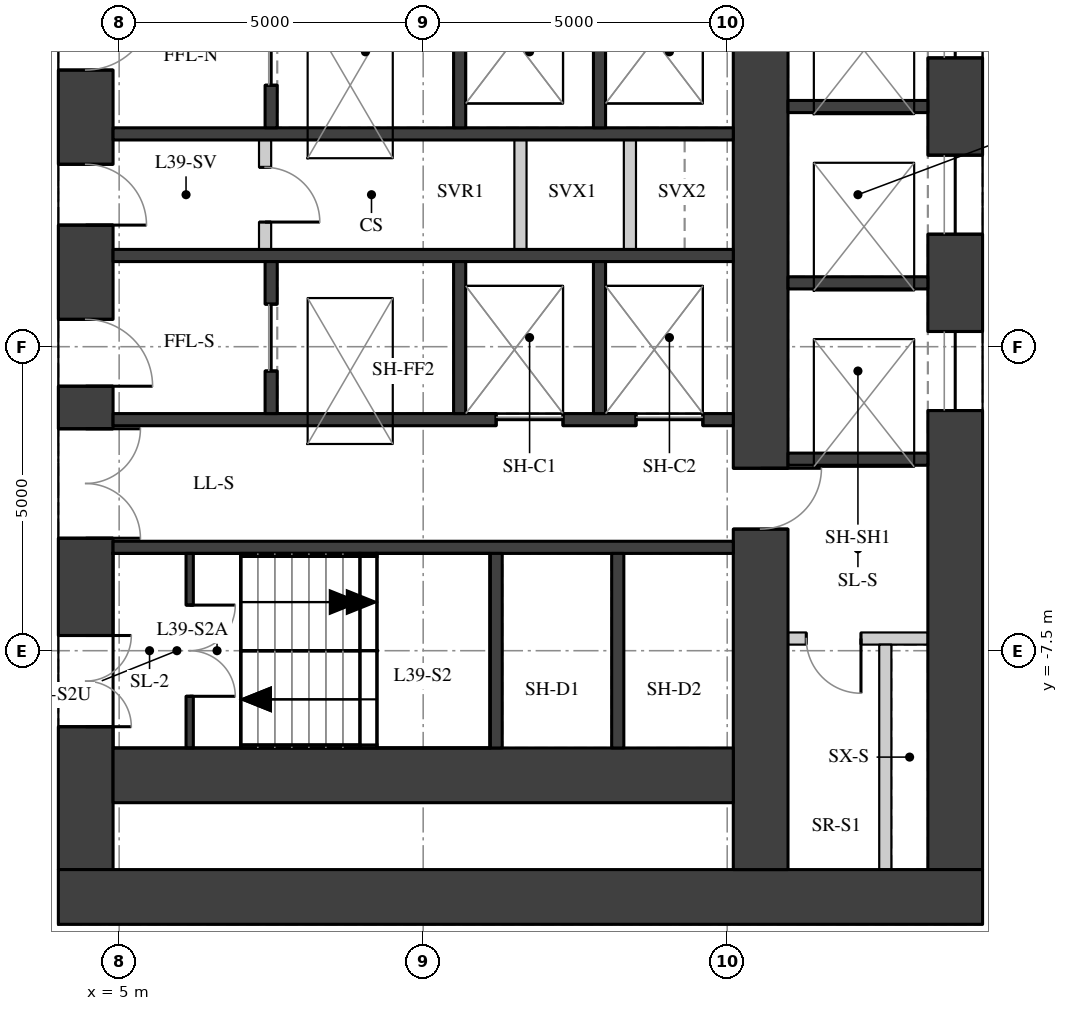
"""IFC4 building model, lengths in metres.
Left out: names, types, materials, properties, quantities, classifications, styles, units other than length and angle.
Written with IfcOpenShell. Run it as: python <this file> out.ifc"""

import sys

from ifc_helpers import new_model, si_unit, direction, frame, frame_2d, origin, place, context, subcontext, project, spatial, rectangle, extrude, element, fill, save


model = new_model("IFC4")
c1 = context("Model", 3, precision=1e-05, world=origin(), true_north=direction((0.0, 1.0)))
c2 = subcontext(c1, "Body", "Model", "MODEL_VIEW")
j1 = project(units=[si_unit("LENGTHUNIT", "METRE"), si_unit("PLANEANGLEUNIT", "RADIAN")], contexts=[c1])
p1 = place(None, origin())
s1 = spatial("IfcSite", under=j1, at=p1, CompositionType="ELEMENT")
p2 = place(p1, origin())
s2 = spatial("IfcBuilding", under=s1, at=p2, CompositionType="ELEMENT")
p3 = place(p2, frame((0.0, 0.0, 139.6)))
s3 = spatial("IfcBuildingStorey", under=s2, at=p3, CompositionType="ELEMENT", Elevation=139.6)
p4 = place(p3, frame((4.45, -11.1, 0.0), z_axis=(0.0, 0.0, 1.0), x_axis=(0.0, 1.0, 0.0)))
e1 = element("IfcWall", 1, at=p4, inside=s3, PredefinedType="SHEAR", context=c2, shape_type="SweptSolid", body=[
    extrude(rectangle(XDim=22.2, YDim=0.9, at=frame_2d((11.1, 0.0))), origin(), (0.0, 0.0, 1.0), 5.22),
])
p5 = place(p4, frame((2.35, 0.0, 0.0)))
e2 = element("IfcOpeningElement", 2, at=p5, cuts=e1, PredefinedType="OPENING", context=c2, shape_type="SweptSolid", body=[
    extrude(rectangle(XDim=1.5, YDim=2.1, at=frame_2d((0.75, 1.05))), frame((0.0, 0.46, 0.0), z_axis=(0.0, -1.0, 0.0), x_axis=(1.0, 0.0, 0.0)), (0.0, 0.0, 1.0), 0.92),
])
p6 = place(p4, frame((5.45, 0.0, 0.0)))
e3 = element("IfcOpeningElement", 3, at=p6, cuts=e1, PredefinedType="OPENING", context=c2, shape_type="SweptSolid", body=[
    extrude(rectangle(XDim=1.8, YDim=2.1, at=frame_2d((0.9, 1.05))), frame((0.0, 0.46, 0.0), z_axis=(0.0, -1.0, 0.0), x_axis=(1.0, 0.0, 0.0)), (0.0, 0.0, 1.0), 0.92),
])
p7 = place(p4, frame((7.95, 0.0, 0.0)))
e4 = element("IfcOpeningElement", 4, at=p7, cuts=e1, PredefinedType="OPENING", context=c2, shape_type="SweptSolid", body=[
    extrude(rectangle(XDim=1.1, YDim=2.1, at=frame_2d((0.55, 1.05))), frame((0.0, 0.46, 0.0), z_axis=(0.0, -1.0, 0.0), x_axis=(1.0, 0.0, 0.0)), (0.0, 0.0, 1.0), 0.92),
])
p8 = place(p4, frame((10.6, 0.0, 0.0)))
e5 = element("IfcOpeningElement", 5, at=p8, cuts=e1, PredefinedType="OPENING", context=c2, shape_type="SweptSolid", body=[
    extrude(rectangle(XDim=1.0, YDim=2.1, at=frame_2d((0.5, 1.05))), frame((0.0, 0.46, 0.0), z_axis=(0.0, -1.0, 0.0), x_axis=(1.0, 0.0, 0.0)), (0.0, 0.0, 1.0), 0.92),
])
p9 = place(p4, frame((13.15, 0.0, 0.0)))
e6 = element("IfcOpeningElement", 6, at=p9, cuts=e1, PredefinedType="OPENING", context=c2, shape_type="SweptSolid", body=[
    extrude(rectangle(XDim=1.1, YDim=2.1, at=frame_2d((0.55, 1.05))), frame((0.0, 0.46, 0.0), z_axis=(0.0, -1.0, 0.0), x_axis=(1.0, 0.0, 0.0)), (0.0, 0.0, 1.0), 0.92),
])
p10 = place(p4, frame((14.95, 0.0, 0.0)))
e7 = element("IfcOpeningElement", 7, at=p10, cuts=e1, PredefinedType="OPENING", context=c2, shape_type="SweptSolid", body=[
    extrude(rectangle(XDim=1.8, YDim=2.1, at=frame_2d((0.9, 1.05))), frame((0.0, 0.46, 0.0), z_axis=(0.0, -1.0, 0.0), x_axis=(1.0, 0.0, 0.0)), (0.0, 0.0, 1.0), 0.92),
])
p11 = place(p4, frame((18.35, 0.0, 0.0)))
e8 = element("IfcOpeningElement", 8, at=p11, cuts=e1, PredefinedType="OPENING", context=c2, shape_type="SweptSolid", body=[
    extrude(rectangle(XDim=1.5, YDim=2.1, at=frame_2d((0.75, 1.05))), frame((0.0, 0.46, 0.0), z_axis=(0.0, -1.0, 0.0), x_axis=(1.0, 0.0, 0.0)), (0.0, 0.0, 1.0), 0.92),
])
p12 = place(p3, frame((18.75, -11.1, 0.0), z_axis=(0.0, 0.0, 1.0), x_axis=(0.0, 1.0, 0.0)))
e9 = element("IfcWall", 9, at=p12, inside=s3, PredefinedType="SHEAR", context=c2, shape_type="SweptSolid", body=[
    extrude(rectangle(XDim=22.2, YDim=0.9, at=frame_2d((11.1, 0.0))), origin(), (0.0, 0.0, 1.0), 5.22),
])
p13 = place(p12, frame((7.55, 0.0, 0.0)))
e10 = element("IfcOpeningElement", 10, at=p13, cuts=e9, PredefinedType="OPENING", context=c2, shape_type="SweptSolid", body=[
    extrude(rectangle(XDim=1.3, YDim=2.1, at=frame_2d((0.65, 1.05))), frame((0.0, 0.46, 0.0), z_axis=(0.0, -1.0, 0.0), x_axis=(1.0, 0.0, 0.0)), (0.0, 0.0, 1.0), 0.92),
])
p14 = place(p12, frame((10.45, 0.0, 0.0)))
e11 = element("IfcOpeningElement", 11, at=p14, cuts=e9, PredefinedType="OPENING", context=c2, shape_type="SweptSolid", body=[
    extrude(rectangle(XDim=1.3, YDim=2.1, at=frame_2d((0.65, 1.05))), frame((0.0, 0.46, 0.0), z_axis=(0.0, -1.0, 0.0), x_axis=(1.0, 0.0, 0.0)), (0.0, 0.0, 1.0), 0.92),
])
p15 = place(p12, frame((13.35, 0.0, 0.0)))
e12 = element("IfcOpeningElement", 12, at=p15, cuts=e9, PredefinedType="OPENING", context=c2, shape_type="SweptSolid", body=[
    extrude(rectangle(XDim=1.3, YDim=2.1, at=frame_2d((0.65, 1.05))), frame((0.0, 0.46, 0.0), z_axis=(0.0, -1.0, 0.0), x_axis=(1.0, 0.0, 0.0)), (0.0, 0.0, 1.0), 0.92),
])
p16 = place(p3, frame((4.0, -11.55, 0.0), z_axis=(0.0, 0.0, 1.0), x_axis=(1.0, 0.0, 0.0)))
e13 = element("IfcWall", 13, at=p16, inside=s3, PredefinedType="SHEAR", context=c2, shape_type="SweptSolid", body=[
    extrude(rectangle(XDim=15.2, YDim=0.9, at=frame_2d((7.6, 0.0))), origin(), (0.0, 0.0, 1.0), 5.22),
])
p17 = place(p3, frame((15.55, -11.1, 0.0), z_axis=(0.0, 0.0, 1.0), x_axis=(0.0, 1.0, 0.0)))
e14 = element("IfcWall", 14, at=p17, inside=s3, PredefinedType="SHEAR", context=c2, shape_type="SweptSolid", body=[
    extrude(rectangle(XDim=22.2, YDim=0.9, at=frame_2d((11.1, 0.0))), origin(), (0.0, 0.0, 1.0), 5.22),
])
p18 = place(p17, frame((15.6, 0.0, 0.0)))
e15 = element("IfcOpeningElement", 15, at=p18, cuts=e14, PredefinedType="OPENING", context=c2, shape_type="SweptSolid", body=[
    extrude(rectangle(XDim=1.0, YDim=2.1, at=frame_2d((0.5, 1.05))), frame((0.0, 0.46, 0.0), z_axis=(0.0, -1.0, 0.0), x_axis=(1.0, 0.0, 0.0)), (0.0, 0.0, 1.0), 0.92),
])
p19 = place(p17, frame((5.6, 0.0, 0.0)))
e16 = element("IfcOpeningElement", 16, at=p19, cuts=e14, PredefinedType="OPENING", context=c2, shape_type="SweptSolid", body=[
    extrude(rectangle(XDim=1.0, YDim=2.1, at=frame_2d((0.5, 1.05))), frame((0.0, 0.46, 0.0), z_axis=(0.0, -1.0, 0.0), x_axis=(1.0, 0.0, 0.0)), (0.0, 0.0, 1.0), 0.92),
])
p20 = place(p3, frame((4.9, -9.55, 0.0), z_axis=(0.0, 0.0, 1.0), x_axis=(1.0, 0.0, 0.0)))
e17 = element("IfcWall", 17, at=p20, inside=s3, PredefinedType="SHEAR", context=c2, shape_type="SweptSolid", body=[
    extrude(rectangle(XDim=10.2, YDim=0.9, at=frame_2d((5.1, 0.0))), origin(), (0.0, 0.0, 1.0), 5.22),
])
for number, where, z_axis, x_axis in (
    (18, (4.9, 1.0, 0.0), (0.0, 0.0, 1.0), (1.0, 0.0, 0.0)),
    (19, (4.9, -1.0, 0.0), (0.0, 0.0, 1.0), (1.0, 0.0, 0.0)),
):
    element("IfcWall", number, at=place(p3, frame(where, z_axis=z_axis, x_axis=x_axis)), inside=s3, PredefinedType="SHEAR", context=c2, shape_type="SweptSolid", body=[
        extrude(rectangle(XDim=10.2, YDim=0.2, at=frame_2d((5.1, 0.0))), origin(), (0.0, 0.0, 1.0), 5.22),
    ])
p21 = place(p3, frame((4.9, -3.7, 0.0), z_axis=(0.0, 0.0, 1.0), x_axis=(1.0, 0.0, 0.0)))
e20 = element("IfcWall", 20, at=p21, inside=s3, PredefinedType="SHEAR", context=c2, shape_type="SweptSolid", body=[
    extrude(rectangle(XDim=10.2, YDim=0.2, at=frame_2d((5.1, 0.0))), origin(), (0.0, 0.0, 1.0), 5.22),
])
p22 = place(p21, frame((6.3, 0.0, 0.0)))
e21 = element("IfcOpeningElement", 21, at=p22, cuts=e20, PredefinedType="OPENING", context=c2, shape_type="SweptSolid", body=[
    extrude(rectangle(XDim=1.1, YDim=2.1, at=frame_2d((0.55, 1.05))), frame((0.0, 0.11, 0.0), z_axis=(0.0, -1.0, 0.0), x_axis=(1.0, 0.0, 0.0)), (0.0, 0.0, 1.0), 0.22),
])
p23 = place(p21, frame((8.6, 0.0, 0.0)))
e22 = element("IfcOpeningElement", 22, at=p23, cuts=e20, PredefinedType="OPENING", context=c2, shape_type="SweptSolid", body=[
    extrude(rectangle(XDim=1.1, YDim=2.1, at=frame_2d((0.55, 1.05))), frame((0.0, 0.11, 0.0), z_axis=(0.0, -1.0, 0.0), x_axis=(1.0, 0.0, 0.0)), (0.0, 0.0, 1.0), 0.22),
])
p24 = place(p3, frame((4.9, -5.8, 0.0), z_axis=(0.0, 0.0, 1.0), x_axis=(1.0, 0.0, 0.0)))
e23 = element("IfcWall", 23, at=p24, inside=s3, PredefinedType="SHEAR", context=c2, shape_type="SweptSolid", body=[
    extrude(rectangle(XDim=10.2, YDim=0.2, at=frame_2d((5.1, 0.0))), origin(), (0.0, 0.0, 1.0), 5.22),
])
for number, where, z_axis, x_axis in (
    (24, (11.2, -9.1, 0.0), (0.0, 0.0, 1.0), (0.0, 1.0, 0.0)),
    (25, (13.2, -9.1, 0.0), (0.0, 0.0, 1.0), (0.0, 1.0, 0.0)),
):
    element("IfcWall", number, at=place(p3, frame(where, z_axis=z_axis, x_axis=x_axis)), inside=s3, PredefinedType="SHEAR", context=c2, shape_type="SweptSolid", body=[
        extrude(rectangle(XDim=3.2, YDim=0.2, at=frame_2d((1.6, 0.0))), origin(), (0.0, 0.0, 1.0), 5.22),
    ])
p25 = place(p3, frame((7.5, 1.1, 0.0), z_axis=(0.0, 0.0, 1.0), x_axis=(0.0, 1.0, 0.0)))
e26 = element("IfcWall", 26, at=p25, inside=s3, PredefinedType="SHEAR", context=c2, shape_type="SweptSolid", body=[
    extrude(rectangle(XDim=2.5, YDim=0.2, at=frame_2d((1.25, 0.0))), origin(), (0.0, 0.0, 1.0), 5.22),
])
p26 = place(p25, frame((0.7, 0.0, 0.0)))
e27 = element("IfcOpeningElement", 27, at=p26, cuts=e26, PredefinedType="OPENING", context=c2, shape_type="SweptSolid", body=[
    extrude(rectangle(XDim=1.1, YDim=2.1, at=frame_2d((0.55, 1.05))), frame((0.0, 0.11, 0.0), z_axis=(0.0, -1.0, 0.0), x_axis=(1.0, 0.0, 0.0)), (0.0, 0.0, 1.0), 0.22),
])
p27 = place(p3, frame((7.5, -3.6, 0.0), z_axis=(0.0, 0.0, 1.0), x_axis=(0.0, 1.0, 0.0)))
e28 = element("IfcWall", 28, at=p27, inside=s3, PredefinedType="SHEAR", context=c2, shape_type="SweptSolid", body=[
    extrude(rectangle(XDim=2.5, YDim=0.2, at=frame_2d((1.25, 0.0))), origin(), (0.0, 0.0, 1.0), 5.22),
])
p28 = place(p27, frame((0.7, 0.0, 0.0)))
e29 = element("IfcOpeningElement", 29, at=p28, cuts=e28, PredefinedType="OPENING", context=c2, shape_type="SweptSolid", body=[
    extrude(rectangle(XDim=1.1, YDim=2.1, at=frame_2d((0.55, 1.05))), frame((0.0, 0.11, 0.0), z_axis=(0.0, -1.0, 0.0), x_axis=(1.0, 0.0, 0.0)), (0.0, 0.0, 1.0), 0.22),
])
for number, where, z_axis, x_axis in (
    (30, (10.6, 1.1, 0.0), (0.0, 0.0, 1.0), (0.0, 1.0, 0.0)),
    (31, (10.6, -3.6, 0.0), (0.0, 0.0, 1.0), (0.0, 1.0, 0.0)),
    (32, (12.9, 1.1, 0.0), (0.0, 0.0, 1.0), (0.0, 1.0, 0.0)),
    (33, (12.9, -3.6, 0.0), (0.0, 0.0, 1.0), (0.0, 1.0, 0.0)),
):
    element("IfcWall", number, at=place(p3, frame(where, z_axis=z_axis, x_axis=x_axis)), inside=s3, PredefinedType="SHEAR", context=c2, shape_type="SweptSolid", body=[
        extrude(rectangle(XDim=2.5, YDim=0.2, at=frame_2d((1.25, 0.0))), origin(), (0.0, 0.0, 1.0), 5.22),
    ])
p29 = place(p3, frame((6.16, -9.1, 0.0), z_axis=(0.0, 0.0, 1.0), x_axis=(0.0, 1.0, 0.0)))
e34 = element("IfcWall", 34, at=p29, inside=s3, PredefinedType="SHEAR", context=c2, shape_type="SweptSolid", body=[
    extrude(rectangle(XDim=3.2, YDim=0.12, at=frame_2d((1.6, 0.0))), origin(), (0.0, 0.0, 1.0), 2.378),
])
p30 = place(p29, frame((0.85, 0.0, 0.0)))
e35 = element("IfcOpeningElement", 35, at=p30, cuts=e34, PredefinedType="OPENING", context=c2, shape_type="SweptSolid", body=[
    extrude(rectangle(XDim=1.5, YDim=2.1, at=frame_2d((0.75, 1.05))), frame((0.0, 0.07, 0.0), z_axis=(0.0, -1.0, 0.0), x_axis=(1.0, 0.0, 0.0)), (0.0, 0.0, 1.0), 0.14),
])
p31 = place(p3, frame((7.4, -0.9, 0.0), z_axis=(0.0, 0.0, 1.0), x_axis=(0.0, 1.0, 0.0)))
e36 = element("IfcWall", 36, at=p31, inside=s3, PredefinedType="PARTITIONING", context=c2, shape_type="SweptSolid", body=[
    extrude(rectangle(XDim=1.8, YDim=0.2, at=frame_2d((0.9, 0.0))), origin(), (0.0, 0.0, 1.0), 5.22),
])
p32 = place(p31, frame((0.45, 0.0, 0.0)))
e37 = element("IfcOpeningElement", 37, at=p32, cuts=e36, PredefinedType="OPENING", context=c2, shape_type="SweptSolid", body=[
    extrude(rectangle(XDim=0.9, YDim=2.1, at=frame_2d((0.45, 1.05))), frame((0.0, 0.11, 0.0), z_axis=(0.0, -1.0, 0.0), x_axis=(1.0, 0.0, 0.0)), (0.0, 0.0, 1.0), 0.22),
])
for number, where, z_axis, x_axis in (
    (38, (11.6, -0.9, 0.0), (0.0, 0.0, 1.0), (0.0, 1.0, 0.0)),
    (39, (13.4, -0.9, 0.0), (0.0, 0.0, 1.0), (0.0, 1.0, 0.0)),
):
    element("IfcWall", number, at=place(p3, frame(where, z_axis=z_axis, x_axis=x_axis)), inside=s3, PredefinedType="PARTITIONING", context=c2, shape_type="SweptSolid", body=[
        extrude(rectangle(XDim=1.8, YDim=0.2, at=frame_2d((0.9, 0.0))), origin(), (0.0, 0.0, 1.0), 5.22),
    ])
for number, where, z_axis, x_axis in (
    (40, (16.0, -4.35, 0.0), (0.0, 0.0, 1.0), (1.0, 0.0, 0.0)),
    (41, (16.0, -1.45, 0.0), (0.0, 0.0, 1.0), (1.0, 0.0, 0.0)),
    (42, (16.0, 1.45, 0.0), (0.0, 0.0, 1.0), (1.0, 0.0, 0.0)),
):
    element("IfcWall", number, at=place(p3, frame(where, z_axis=z_axis, x_axis=x_axis)), inside=s3, PredefinedType="SHEAR", context=c2, shape_type="SweptSolid", body=[
        extrude(rectangle(XDim=2.3, YDim=0.2, at=frame_2d((1.15, 0.0))), origin(), (0.0, 0.0, 1.0), 5.22),
    ])
p33 = place(p3, frame((16.0, -7.3, 0.0), z_axis=(0.0, 0.0, 1.0), x_axis=(1.0, 0.0, 0.0)))
e43 = element("IfcWall", 43, at=p33, inside=s3, PredefinedType="PARTITIONING", context=c2, shape_type="SweptSolid", body=[
    extrude(rectangle(XDim=2.3, YDim=0.2, at=frame_2d((1.15, 0.0))), origin(), (0.0, 0.0, 1.0), 5.22),
])
p34 = place(p33, frame((0.3, 0.0, 0.0)))
e44 = element("IfcOpeningElement", 44, at=p34, cuts=e43, PredefinedType="OPENING", context=c2, shape_type="SweptSolid", body=[
    extrude(rectangle(XDim=0.9, YDim=2.1, at=frame_2d((0.45, 1.05))), frame((0.0, 0.11, 0.0), z_axis=(0.0, -1.0, 0.0), x_axis=(1.0, 0.0, 0.0)), (0.0, 0.0, 1.0), 0.22),
])
p35 = place(p3, frame((17.6, -11.1, 0.0), z_axis=(0.0, 0.0, 1.0), x_axis=(0.0, 1.0, 0.0)))
e45 = element("IfcWall", 45, at=p35, inside=s3, PredefinedType="PARTITIONING", context=c2, shape_type="SweptSolid", body=[
    extrude(rectangle(XDim=3.7, YDim=0.2, at=frame_2d((1.85, 0.0))), origin(), (0.0, 0.0, 1.0), 5.22),
])
p36 = place(p5, origin())
e46 = element("IfcDoor", 46, at=p36, inside=s3, OperationType="DOUBLE_DOOR_SINGLE_SWING", PredefinedType="DOOR", context=c2, shape_type="SweptSolid", body=[
    extrude(rectangle(XDim=1.5, YDim=2.1, at=frame_2d((0.75, 1.05))), frame((0.0, 0.025, 0.0), z_axis=(0.0, -1.0, 0.0), x_axis=(1.0, 0.0, 0.0)), (0.0, 0.0, 1.0), 0.05),
])
fill(e2, e46)
p37 = place(p6, origin())
e47 = element("IfcDoor", 47, at=p37, inside=s3, OperationType="DOUBLE_DOOR_SINGLE_SWING", PredefinedType="DOOR", context=c2, shape_type="SweptSolid", body=[
    extrude(rectangle(XDim=1.8, YDim=2.1, at=frame_2d((0.9, 1.05))), frame((0.0, 0.025, 0.0), z_axis=(0.0, -1.0, 0.0), x_axis=(1.0, 0.0, 0.0)), (0.0, 0.0, 1.0), 0.05),
])
fill(e3, e47)
p38 = place(p7, origin())
e48 = element("IfcDoor", 48, at=p38, inside=s3, OperationType="SINGLE_SWING_RIGHT", PredefinedType="DOOR", context=c2, shape_type="SweptSolid", body=[
    extrude(rectangle(XDim=1.1, YDim=2.1, at=frame_2d((0.55, 1.05))), frame((0.0, 0.025, 0.0), z_axis=(0.0, -1.0, 0.0), x_axis=(1.0, 0.0, 0.0)), (0.0, 0.0, 1.0), 0.05),
])
fill(e4, e48)
p39 = place(p8, origin())
e49 = element("IfcDoor", 49, at=p39, inside=s3, OperationType="SINGLE_SWING_RIGHT", PredefinedType="DOOR", context=c2, shape_type="SweptSolid", body=[
    extrude(rectangle(XDim=1.0, YDim=2.1, at=frame_2d((0.5, 1.05))), frame((0.0, 0.025, 0.0), z_axis=(0.0, -1.0, 0.0), x_axis=(1.0, 0.0, 0.0)), (0.0, 0.0, 1.0), 0.05),
])
fill(e5, e49)
p40 = place(p9, origin())
e50 = element("IfcDoor", 50, at=p40, inside=s3, OperationType="SINGLE_SWING_LEFT", PredefinedType="DOOR", context=c2, shape_type="SweptSolid", body=[
    extrude(rectangle(XDim=1.1, YDim=2.1, at=frame_2d((0.55, 1.05))), frame((0.0, 0.025, 0.0), z_axis=(0.0, -1.0, 0.0), x_axis=(1.0, 0.0, 0.0)), (0.0, 0.0, 1.0), 0.05),
])
fill(e6, e50)
p41 = place(p30, origin())
e51 = element("IfcDoor", 51, at=p41, inside=s3, OperationType="DOUBLE_DOOR_SINGLE_SWING", PredefinedType="DOOR", context=c2, shape_type="SweptSolid", body=[
    extrude(rectangle(XDim=1.5, YDim=2.1, at=frame_2d((0.75, 1.05))), frame((0.0, 0.025, 0.0), z_axis=(0.0, -1.0, 0.0), x_axis=(1.0, 0.0, 0.0)), (0.0, 0.0, 1.0), 0.05),
])
fill(e35, e51)
p42 = place(p22, origin())
e52 = element("IfcDoor", 52, at=p42, inside=s3, OperationType="DOUBLE_DOOR_SLIDING", PredefinedType="DOOR", context=c2, shape_type="SweptSolid", body=[
    extrude(rectangle(XDim=1.1, YDim=2.1, at=frame_2d((0.55, 1.05))), frame((0.0, 0.025, 0.0), z_axis=(0.0, -1.0, 0.0), x_axis=(1.0, 0.0, 0.0)), (0.0, 0.0, 1.0), 0.05),
])
fill(e21, e52)
p43 = place(p23, origin())
e53 = element("IfcDoor", 53, at=p43, inside=s3, OperationType="DOUBLE_DOOR_SLIDING", PredefinedType="DOOR", context=c2, shape_type="SweptSolid", body=[
    extrude(rectangle(XDim=1.1, YDim=2.1, at=frame_2d((0.55, 1.05))), frame((0.0, 0.025, 0.0), z_axis=(0.0, -1.0, 0.0), x_axis=(1.0, 0.0, 0.0)), (0.0, 0.0, 1.0), 0.05),
])
fill(e22, e53)
p44 = place(p26, origin())
e54 = element("IfcDoor", 54, at=p44, inside=s3, OperationType="DOUBLE_DOOR_SLIDING", PredefinedType="DOOR", context=c2, shape_type="SweptSolid", body=[
    extrude(rectangle(XDim=1.1, YDim=2.1, at=frame_2d((0.55, 1.05))), frame((0.0, 0.025, 0.0), z_axis=(0.0, -1.0, 0.0), x_axis=(1.0, 0.0, 0.0)), (0.0, 0.0, 1.0), 0.05),
])
fill(e27, e54)
p45 = place(p28, origin())
e55 = element("IfcDoor", 55, at=p45, inside=s3, OperationType="DOUBLE_DOOR_SLIDING", PredefinedType="DOOR", context=c2, shape_type="SweptSolid", body=[
    extrude(rectangle(XDim=1.1, YDim=2.1, at=frame_2d((0.55, 1.05))), frame((0.0, 0.025, 0.0), z_axis=(0.0, -1.0, 0.0), x_axis=(1.0, 0.0, 0.0)), (0.0, 0.0, 1.0), 0.05),
])
fill(e29, e55)
p46 = place(p13, origin())
e56 = element("IfcDoor", 56, at=p46, inside=s3, OperationType="DOUBLE_DOOR_SLIDING", PredefinedType="DOOR", context=c2, shape_type="SweptSolid", body=[
    extrude(rectangle(XDim=1.3, YDim=2.1, at=frame_2d((0.65, 1.05))), frame((0.0, 0.025, 0.0), z_axis=(0.0, -1.0, 0.0), x_axis=(1.0, 0.0, 0.0)), (0.0, 0.0, 1.0), 0.05),
])
fill(e10, e56)
p47 = place(p14, origin())
e57 = element("IfcDoor", 57, at=p47, inside=s3, OperationType="DOUBLE_DOOR_SLIDING", PredefinedType="DOOR", context=c2, shape_type="SweptSolid", body=[
    extrude(rectangle(XDim=1.3, YDim=2.1, at=frame_2d((0.65, 1.05))), frame((0.0, 0.025, 0.0), z_axis=(0.0, -1.0, 0.0), x_axis=(1.0, 0.0, 0.0)), (0.0, 0.0, 1.0), 0.05),
])
fill(e11, e57)
p48 = place(p15, origin())
e58 = element("IfcDoor", 58, at=p48, inside=s3, OperationType="DOUBLE_DOOR_SLIDING", PredefinedType="DOOR", context=c2, shape_type="SweptSolid", body=[
    extrude(rectangle(XDim=1.3, YDim=2.1, at=frame_2d((0.65, 1.05))), frame((0.0, 0.025, 0.0), z_axis=(0.0, -1.0, 0.0), x_axis=(1.0, 0.0, 0.0)), (0.0, 0.0, 1.0), 0.05),
])
fill(e12, e58)
p49 = place(p32, origin())
e59 = element("IfcDoor", 59, at=p49, inside=s3, OperationType="SINGLE_SWING_RIGHT", PredefinedType="DOOR", context=c2, shape_type="SweptSolid", body=[
    extrude(rectangle(XDim=0.9, YDim=2.1, at=frame_2d((0.45, 1.05))), frame((0.0, 0.025, 0.0), z_axis=(0.0, -1.0, 0.0), x_axis=(1.0, 0.0, 0.0)), (0.0, 0.0, 1.0), 0.05),
])
fill(e37, e59)
p50 = place(p19, origin())
e60 = element("IfcDoor", 60, at=p50, inside=s3, OperationType="SINGLE_SWING_LEFT", PredefinedType="DOOR", context=c2, shape_type="SweptSolid", body=[
    extrude(rectangle(XDim=1.0, YDim=2.1, at=frame_2d((0.5, 1.05))), frame((0.0, 0.025, 0.0), z_axis=(0.0, -1.0, 0.0), x_axis=(1.0, 0.0, 0.0)), (0.0, 0.0, 1.0), 0.05),
])
fill(e16, e60)
p51 = place(p34, origin())
e61 = element("IfcDoor", 61, at=p51, inside=s3, OperationType="SINGLE_SWING_LEFT", PredefinedType="DOOR", context=c2, shape_type="SweptSolid", body=[
    extrude(rectangle(XDim=0.9, YDim=2.1, at=frame_2d((0.45, 1.05))), frame((0.0, 0.025, 0.0), z_axis=(0.0, -1.0, 0.0), x_axis=(1.0, 0.0, 0.0)), (0.0, 0.0, 1.0), 0.05),
])
fill(e44, e61)
save(model, sys.argv[1])
